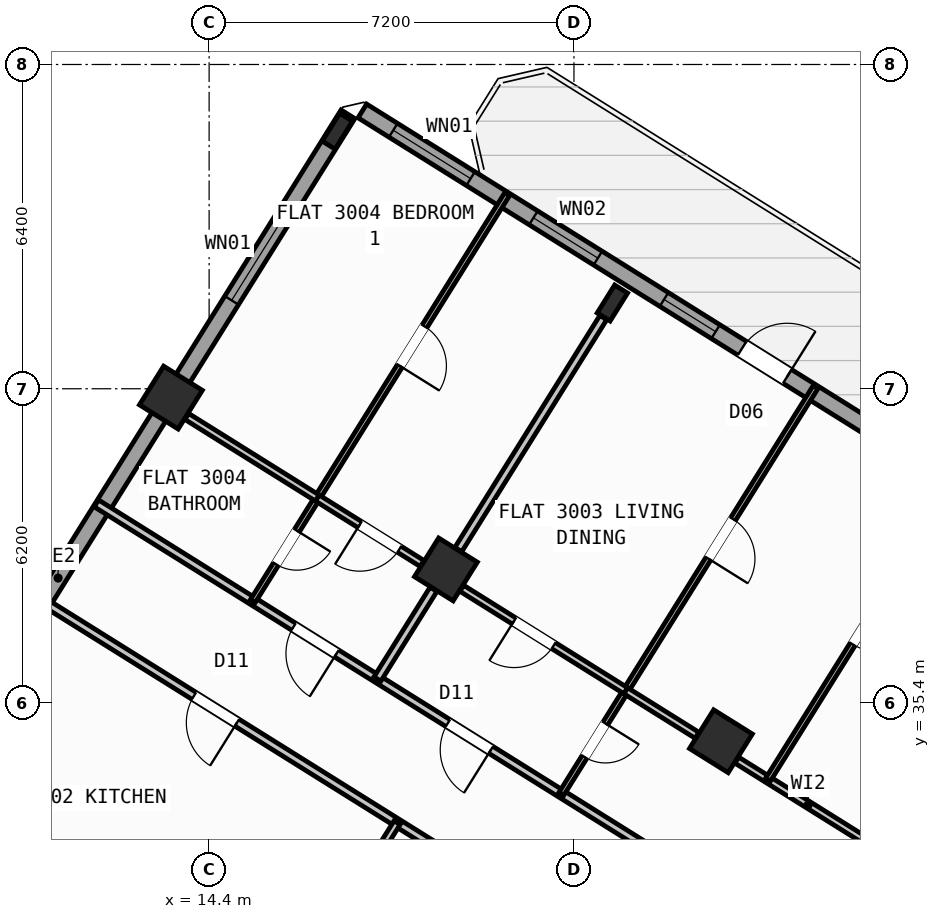
"""IFC4 building model, lengths in metres.
Left out: names, types, materials, properties, quantities, classifications, styles, units other than length and angle.
Written with IfcOpenShell. Run it as: python <this file> out.ifc"""

import sys

from ifc_helpers import new_model, si_unit, direction, frame, frame_2d, origin, origin_2d, place, context, subcontext, project, spatial, rectangle, hollow_rectangle, i_section, extrude, source, transform, mapped, element, fill, save


model = new_model("IFC4")
c1 = context("Model", 3, precision=1e-05, world=origin(), true_north=direction((0.0, 1.0)))
c2 = subcontext(c1, "Body", "Model", "MODEL_VIEW")
j1 = project(units=[si_unit("LENGTHUNIT", "METRE"), si_unit("PLANEANGLEUNIT", "RADIAN")], contexts=[c1])
p1 = place(None, origin())
s1 = spatial("IfcSite", under=j1, at=p1, CompositionType="ELEMENT")
p2 = place(p1, origin())
s2 = spatial("IfcBuilding", under=s1, at=p2, CompositionType="ELEMENT")
p3 = place(p2, frame((0.0, 0.0, 119.7)))
s3 = spatial("IfcBuildingStorey", under=s2, at=p3, CompositionType="ELEMENT", Elevation=119.7)
m1 = source(origin(), c2, "Body", "SweptSolid", [
    extrude(hollow_rectangle(XDim=0.9, YDim=0.9, WallThickness=0.036, at=origin_2d()), origin(), (0.0, 0.0, 1.0), 3.6),
])
p4 = place(p3, frame((24.5, 34.643, 0.0), z_axis=(0.0, 0.0, 1.0), x_axis=(-0.848048096156, 0.529919264233, 0.0)))
e1 = element("IfcColumn", 1, at=p4, inside=s3, PredefinedType="COLUMN", context=c2, shape_type="MappedRepresentation", body=[
    mapped(m1, transform((0.0, 0.0, 0.0), scale=1.0)),
])
m2 = source(origin(), c2, "Body", "SweptSolid", [
    extrude(i_section(OverallWidth=0.3, OverallDepth=0.65, WebThickness=0.016, FlangeThickness=0.031, at=origin_2d()), origin(), (0.0, 0.0, 1.0), 3.6),
])
p5 = place(p3, frame((22.358, 43.292, 0.0), z_axis=(0.0, 0.0, 1.0), x_axis=(-0.848048096156, 0.529919264233, 0.0)))
e2 = element("IfcColumn", 2, at=p5, inside=s3, PredefinedType="COLUMN", context=c2, shape_type="MappedRepresentation", body=[
    mapped(m2, transform((0.0, 0.0, 0.0), scale=1.0)),
])
p6 = place(p3, frame((19.073, 38.034, 0.0), z_axis=(0.0, 0.0, 1.0), x_axis=(-0.848048096156, 0.529919264233, 0.0)))
e3 = element("IfcColumn", 3, at=p6, inside=s3, PredefinedType="COLUMN", context=c2, shape_type="MappedRepresentation", body=[
    mapped(m1, transform((0.0, 0.0, 0.0), scale=1.0)),
])
p7 = place(p3, frame((16.931, 46.684, 0.0), z_axis=(0.0, 0.0, 1.0), x_axis=(-0.848048096156, 0.529919264233, 0.0)))
e4 = element("IfcColumn", 4, at=p7, inside=s3, PredefinedType="COLUMN", context=c2, shape_type="MappedRepresentation", body=[
    mapped(m2, transform((0.0, 0.0, 0.0), scale=1.0)),
])
p8 = place(p3, frame((13.646, 41.426, 0.0), z_axis=(0.0, 0.0, 1.0), x_axis=(-0.848048096156, 0.529919264233, 0.0)))
e5 = element("IfcColumn", 5, at=p8, inside=s3, PredefinedType="COLUMN", context=c2, shape_type="MappedRepresentation", body=[
    mapped(m1, transform((0.0, 0.0, 0.0), scale=1.0)),
])
p9 = place(p3, frame((5.7, 28.71, 0.0), z_axis=(0.0, 0.0, 1.0), x_axis=(0.529923711467, 0.8480453172, 0.0)))
e6 = element("IfcWall", 6, at=p9, inside=s3, PredefinedType="STANDARD", context=c2, shape_type="SweptSolid", body=[
    extrude(rectangle(XDim=21.587, YDim=0.32, at=frame_2d((10.794, 0.0))), origin(), (0.0, 0.0, 1.0), 2.775),
])
p10 = place(p9, frame((2.119, 0.0, 0.8)))
e7 = element("IfcOpeningElement", 7, at=p10, cuts=e6, PredefinedType="OPENING", context=c2, shape_type="SweptSolid", body=[
    extrude(rectangle(XDim=2.1, YDim=1.55, at=frame_2d((1.05, 0.775))), frame((0.0, 0.17, 0.0), z_axis=(0.0, -1.0, 0.0), x_axis=(1.0, 0.0, 0.0)), (0.0, 0.0, 1.0), 0.34),
])
p11 = place(p9, frame((17.256, 0.0, 0.85)))
e8 = element("IfcOpeningElement", 8, at=p11, cuts=e6, PredefinedType="OPENING", context=c2, shape_type="SweptSolid", body=[
    extrude(rectangle(XDim=1.8, YDim=1.5, at=frame_2d((0.9, 0.75))), frame((0.0, 0.17, 0.0), z_axis=(0.0, -1.0, 0.0), x_axis=(1.0, 0.0, 0.0)), (0.0, 0.0, 1.0), 0.34),
])
p12 = place(p3, frame((17.424, 47.083, 0.0), z_axis=(0.0, 0.0, 1.0), x_axis=(0.848049927979, -0.529916332693, 0.0)))
e9 = element("IfcWall", 9, at=p12, inside=s3, PredefinedType="STANDARD", context=c2, shape_type="SweptSolid", body=[
    extrude(rectangle(XDim=29.223, YDim=0.32, at=frame_2d((14.612, 0.0))), origin(), (0.0, 0.0, 1.0), 3.35),
])
p13 = place(p12, frame((8.839, 0.0, 0.0)))
e10 = element("IfcOpeningElement", 10, at=p13, cuts=e9, PredefinedType="OPENING", context=c2, shape_type="SweptSolid", body=[
    extrude(rectangle(XDim=1.05, YDim=2.15, at=frame_2d((0.525, 1.075))), frame((0.0, 0.17, 0.0), z_axis=(0.0, -1.0, 0.0), x_axis=(1.0, 0.0, 0.0)), (0.0, 0.0, 1.0), 0.34),
])
p14 = place(p12, frame((0.719, 0.0, 0.85)))
e11 = element("IfcOpeningElement", 11, at=p14, cuts=e9, PredefinedType="OPENING", context=c2, shape_type="SweptSolid", body=[
    extrude(rectangle(XDim=1.8, YDim=1.5, at=frame_2d((0.9, 0.75))), frame((0.0, 0.17, 0.0), z_axis=(0.0, -1.0, 0.0), x_axis=(1.0, 0.0, 0.0)), (0.0, 0.0, 1.0), 0.34),
])
p15 = place(p12, frame((3.981, 0.0, 0.85)))
e12 = element("IfcOpeningElement", 12, at=p15, cuts=e9, PredefinedType="OPENING", context=c2, shape_type="SweptSolid", body=[
    extrude(rectangle(XDim=1.5, YDim=1.5, at=frame_2d((0.75, 0.75))), frame((0.0, 0.17, 0.0), z_axis=(0.0, -1.0, 0.0), x_axis=(1.0, 0.0, 0.0)), (0.0, 0.0, 1.0), 0.34),
])
p16 = place(p12, frame((7.021, 0.0, 0.95)))
e13 = element("IfcOpeningElement", 13, at=p16, cuts=e9, PredefinedType="OPENING", context=c2, shape_type="SweptSolid", body=[
    extrude(rectangle(XDim=1.2, YDim=1.4, at=frame_2d((0.6, 0.7))), frame((0.0, 0.17, 0.0), z_axis=(0.0, -1.0, 0.0), x_axis=(1.0, 0.0, 0.0)), (0.0, 0.0, 1.0), 0.34),
])
p17 = place(p12, frame((14.471, 0.0, 0.95)))
e14 = element("IfcOpeningElement", 14, at=p17, cuts=e9, PredefinedType="OPENING", context=c2, shape_type="SweptSolid", body=[
    extrude(rectangle(XDim=1.2, YDim=1.4, at=frame_2d((0.6, 0.7))), frame((0.0, 0.17, 0.0), z_axis=(0.0, -1.0, 0.0), x_axis=(1.0, 0.0, 0.0)), (0.0, 0.0, 1.0), 0.34),
])
p18 = place(p12, frame((17.254, 0.0, 1.0)))
e15 = element("IfcOpeningElement", 15, at=p18, cuts=e9, PredefinedType="OPENING", context=c2, shape_type="SweptSolid", body=[
    extrude(rectangle(XDim=0.9, YDim=1.25, at=frame_2d((0.45, 0.625))), frame((0.0, 0.17, 0.0), z_axis=(0.0, -1.0, 0.0), x_axis=(1.0, 0.0, 0.0)), (0.0, 0.0, 1.0), 0.34),
])
p19 = place(p12, frame((20.764, 0.0, 0.8)))
e16 = element("IfcOpeningElement", 16, at=p19, cuts=e9, PredefinedType="OPENING", context=c2, shape_type="SweptSolid", body=[
    extrude(rectangle(XDim=2.1, YDim=1.55, at=frame_2d((1.05, 0.775))), frame((0.0, 0.17, 0.0), z_axis=(0.0, -1.0, 0.0), x_axis=(1.0, 0.0, 0.0)), (0.0, 0.0, 1.0), 0.34),
])
p20 = place(p12, frame((25.403, 0.0, 0.8)))
e17 = element("IfcOpeningElement", 17, at=p20, cuts=e9, PredefinedType="OPENING", context=c2, shape_type="SweptSolid", body=[
    extrude(rectangle(XDim=2.1, YDim=1.55, at=frame_2d((1.05, 0.775))), frame((0.0, 0.17, 0.0), z_axis=(0.0, -1.0, 0.0), x_axis=(1.0, 0.0, 0.0)), (0.0, 0.0, 1.0), 0.34),
])
p21 = place(p3, frame((31.239, 38.274, 0.0), z_axis=(0.0, 0.0, 1.0), x_axis=(-0.529920220799, -0.848047498427, 0.0)))
e18 = element("IfcWall", 18, at=p21, inside=s3, PredefinedType="PARTITIONING", context=c2, shape_type="SweptSolid", body=[
    extrude(rectangle(XDim=9.2, YDim=0.16, at=frame_2d((4.6, 0.0))), origin(), (0.0, 0.0, 1.0), 3.34),
])
p22 = place(p3, frame((26.363, 30.472, 0.0), z_axis=(0.0, 0.0, 1.0), x_axis=(-0.848052408131, 0.529912363569, 0.0)))
e19 = element("IfcWall", 19, at=p22, inside=s3, PredefinedType="PARTITIONING", context=c2, shape_type="SweptSolid", body=[
    extrude(rectangle(XDim=16.73, YDim=0.16, at=frame_2d((8.365, 0.0))), origin(), (0.0, 0.0, 1.0), 3.34),
])
p23 = place(p22, frame((7.55, 0.0, 0.0)))
e20 = element("IfcOpeningElement", 20, at=p23, cuts=e19, PredefinedType="OPENING", context=c2, shape_type="SweptSolid", body=[
    extrude(rectangle(XDim=1.0, YDim=2.1, at=frame_2d((0.5, 1.05))), frame((0.0, 0.09, 0.0), z_axis=(0.0, -1.0, 0.0), x_axis=(1.0, 0.0, 0.0)), (0.0, 0.0, 1.0), 0.18),
])
p24 = place(p22, frame((11.14, 0.0, 0.0)))
e21 = element("IfcOpeningElement", 21, at=p24, cuts=e19, PredefinedType="OPENING", context=c2, shape_type="SweptSolid", body=[
    extrude(rectangle(XDim=1.0, YDim=2.1, at=frame_2d((0.5, 1.05))), frame((0.0, 0.09, 0.0), z_axis=(0.0, -1.0, 0.0), x_axis=(1.0, 0.0, 0.0)), (0.0, 0.0, 1.0), 0.18),
])
p25 = place(p3, frame((25.198, 28.606, 0.0), z_axis=(0.0, 0.0, 1.0), x_axis=(-0.848052408131, 0.529912363569, 0.0)))
e22 = element("IfcWall", 22, at=p25, inside=s3, PredefinedType="PARTITIONING", context=c2, shape_type="SweptSolid", body=[
    extrude(rectangle(XDim=16.73, YDim=0.16, at=frame_2d((8.365, 0.0))), origin(), (0.0, 0.0, 1.0), 3.34),
])
p26 = place(p25, frame((2.22, 0.0, 0.0)))
e23 = element("IfcOpeningElement", 23, at=p26, cuts=e22, PredefinedType="OPENING", context=c2, shape_type="SweptSolid", body=[
    extrude(rectangle(XDim=0.86, YDim=2.05, at=frame_2d((0.43, 1.025))), frame((0.0, 0.09, 0.0), z_axis=(0.0, -1.0, 0.0), x_axis=(1.0, 0.0, 0.0)), (0.0, 0.0, 1.0), 0.18),
])
p27 = place(p25, frame((12.084, 0.0, 0.0)))
e24 = element("IfcOpeningElement", 24, at=p27, cuts=e22, PredefinedType="OPENING", context=c2, shape_type="SweptSolid", body=[
    extrude(rectangle(XDim=1.0, YDim=2.1, at=frame_2d((0.5, 1.05))), frame((0.0, 0.09, 0.0), z_axis=(0.0, -1.0, 0.0), x_axis=(1.0, 0.0, 0.0)), (0.0, 0.0, 1.0), 0.18),
])
p28 = place(p3, frame((19.556, 26.73, 0.0), z_axis=(0.0, 0.0, 1.0), x_axis=(-0.848043949058, 0.52992590092, 0.0)))
e25 = element("IfcWall", 25, at=p28, inside=s3, PredefinedType="PLUMBINGWALL", context=c2, shape_type="SweptSolid", body=[
    extrude(rectangle(XDim=12.92, YDim=0.14, at=frame_2d((6.46, 0.0))), origin(), (0.0, 0.0, 1.0), 3.34),
])
p29 = place(p28, frame((5.849, 0.0, 0.0)))
e26 = element("IfcOpeningElement", 26, at=p29, cuts=e25, PredefinedType="OPENING", context=c2, shape_type="SweptSolid", body=[
    extrude(rectangle(XDim=0.92, YDim=2.08, at=frame_2d((0.46, 1.04))), frame((0.0, 0.08, 0.0), z_axis=(0.0, -1.0, 0.0), x_axis=(1.0, 0.0, 0.0)), (0.0, 0.0, 1.0), 0.16),
])
p30 = place(p3, frame((18.109, 33.035, 0.0), z_axis=(0.0, 0.0, 1.0), x_axis=(-0.529893526057, -0.848064178611, 0.0)))
e27 = element("IfcWall", 27, at=p30, inside=s3, PredefinedType="PLUMBINGWALL", context=c2, shape_type="SweptSolid", body=[
    extrude(rectangle(XDim=4.58, YDim=0.14, at=frame_2d((2.29, 0.0))), origin(), (0.0, 0.0, 1.0), 3.34),
])
p31 = place(p30, frame((1.9, 0.0, 0.0)))
e28 = element("IfcOpeningElement", 28, at=p31, cuts=e27, PredefinedType="OPENING", context=c2, shape_type="SweptSolid", body=[
    extrude(rectangle(XDim=0.78, YDim=2.05, at=frame_2d((0.39, 1.025))), frame((0.0, 0.08, 0.0), z_axis=(0.0, -1.0, 0.0), x_axis=(1.0, 0.0, 0.0)), (0.0, 0.0, 1.0), 0.16),
])
p32 = place(p3, frame((22.18, 43.006, 0.0), z_axis=(0.0, 0.0, 1.0), x_axis=(-0.529913610495, -0.848051628978, 0.0)))
e29 = element("IfcWall", 29, at=p32, inside=s3, PredefinedType="PARTITIONING", context=c2, shape_type="SweptSolid", body=[
    extrude(rectangle(XDim=5.401, YDim=0.16, at=frame_2d((2.7, 0.0))), origin(), (0.0, 0.0, 1.0), 2.775),
])
p33 = place(p3, frame((18.828, 37.643, 0.0), z_axis=(0.0, 0.0, 1.0), x_axis=(-0.529904345651, -0.848057418139, 0.0)))
e30 = element("IfcWall", 30, at=p33, inside=s3, PredefinedType="PARTITIONING", context=c2, shape_type="SweptSolid", body=[
    extrude(rectangle(XDim=2.088, YDim=0.16, at=frame_2d((1.044, 0.0))), origin(), (0.0, 0.0, 1.0), 2.775),
])
p34 = place(p3, frame((26.37, 41.635, 0.0), z_axis=(0.0, 0.0, 1.0), x_axis=(-0.529917830441, -0.848048992088, 0.0)))
e31 = element("IfcWall", 31, at=p34, inside=s3, PredefinedType="PARTITIONING", context=c2, shape_type="SweptSolid", body=[
    extrude(rectangle(XDim=9.47, YDim=0.11, at=frame_2d((4.735, 0.0))), origin(), (0.0, 0.0, 1.0), 2.995),
])
p35 = place(p34, frame((7.83, 0.0, 0.0)))
e32 = element("IfcOpeningElement", 32, at=p35, cuts=e31, PredefinedType="OPENING", context=c2, shape_type="SweptSolid", body=[
    extrude(rectangle(XDim=0.78, YDim=2.05, at=frame_2d((0.39, 1.025))), frame((0.0, 0.065, 0.0), z_axis=(0.0, -1.0, 0.0), x_axis=(1.0, 0.0, 0.0)), (0.0, 0.0, 1.0), 0.13),
])
p36 = place(p34, frame((3.075, 0.0, 0.0)))
e33 = element("IfcOpeningElement", 33, at=p36, cuts=e31, PredefinedType="OPENING", context=c2, shape_type="SweptSolid", body=[
    extrude(rectangle(XDim=0.92, YDim=2.08, at=frame_2d((0.46, 1.04))), frame((0.0, 0.065, 0.0), z_axis=(0.0, -1.0, 0.0), x_axis=(1.0, 0.0, 0.0)), (0.0, 0.0, 1.0), 0.13),
])
p37 = place(p3, frame((22.623, 35.639, 0.0), z_axis=(0.0, 0.0, 1.0), x_axis=(-0.8480485946, 0.529918466555, 0.0)))
e34 = element("IfcWall", 34, at=p37, inside=s3, PredefinedType="PLUMBINGWALL", context=c2, shape_type="SweptSolid", body=[
    extrude(rectangle(XDim=3.818, YDim=0.14, at=frame_2d((1.909, 0.0))), origin(), (0.0, 0.0, 1.0), 2.775),
])
p38 = place(p37, frame((1.68, 0.0, 0.0)))
e35 = element("IfcOpeningElement", 35, at=p38, cuts=e34, PredefinedType="OPENING", context=c2, shape_type="SweptSolid", body=[
    extrude(rectangle(XDim=0.92, YDim=2.08, at=frame_2d((0.46, 1.04))), frame((0.0, 0.08, 0.0), z_axis=(0.0, -1.0, 0.0), x_axis=(1.0, 0.0, 0.0)), (0.0, 0.0, 1.0), 0.16),
])
p39 = place(p3, frame((27.635, 32.507, 0.0), z_axis=(0.0, 0.0, 1.0), x_axis=(-0.848064240775, 0.529893426567, 0.0)))
e36 = element("IfcWall", 36, at=p39, inside=s3, PredefinedType="PLUMBINGWALL", context=c2, shape_type="SweptSolid", body=[
    extrude(rectangle(XDim=3.328, YDim=0.14, at=frame_2d((1.664, 0.0))), origin(), (0.0, 0.0, 1.0), 2.775),
])
p40 = place(p3, frame((24.029, 34.76, 0.0), z_axis=(0.0, 0.0, 1.0), x_axis=(-0.848023120795, 0.529959231071, 0.0)))
e37 = element("IfcWall", 37, at=p40, inside=s3, PredefinedType="PLUMBINGWALL", context=c2, shape_type="SweptSolid", body=[
    extrude(rectangle(XDim=1.658, YDim=0.14, at=frame_2d((0.829, 0.0))), origin(), (0.0, 0.0, 1.0), 2.775),
])
p41 = place(p3, frame((29.177, 39.881, 0.0), z_axis=(0.0, 0.0, 1.0), x_axis=(-0.529930649952, -0.848040981463, 0.0)))
e38 = element("IfcWall", 38, at=p41, inside=s3, PredefinedType="PARTITIONING", context=c2, shape_type="SweptSolid", body=[
    extrude(rectangle(XDim=7.07, YDim=0.11, at=frame_2d((3.535, 0.0))), origin(), (0.0, 0.0, 1.0), 3.34),
])
p42 = place(p41, frame((3.0, 0.0, 0.0)))
e39 = element("IfcOpeningElement", 39, at=p42, cuts=e38, PredefinedType="OPENING", context=c2, shape_type="SweptSolid", body=[
    extrude(rectangle(XDim=0.92, YDim=2.08, at=frame_2d((0.46, 1.04))), frame((0.0, 0.065, 0.0), z_axis=(0.0, -1.0, 0.0), x_axis=(1.0, 0.0, 0.0)), (0.0, 0.0, 1.0), 0.13),
])
p43 = place(p3, frame((20.281, 45.44, 0.0), z_axis=(0.0, 0.0, 1.0), x_axis=(-0.529917830441, -0.848048992088, 0.0)))
e40 = element("IfcWall", 40, at=p43, inside=s3, PredefinedType="PARTITIONING", context=c2, shape_type="SweptSolid", body=[
    extrude(rectangle(XDim=9.47, YDim=0.11, at=frame_2d((4.735, 0.0))), origin(), (0.0, 0.0, 1.0), 3.34),
])
p44 = place(p43, frame((7.83, 0.0, 0.0)))
e41 = element("IfcOpeningElement", 41, at=p44, cuts=e40, PredefinedType="OPENING", context=c2, shape_type="SweptSolid", body=[
    extrude(rectangle(XDim=0.78, YDim=2.05, at=frame_2d((0.39, 1.025))), frame((0.0, 0.065, 0.0), z_axis=(0.0, -1.0, 0.0), x_axis=(1.0, 0.0, 0.0)), (0.0, 0.0, 1.0), 0.13),
])
p45 = place(p43, frame((3.075, 0.0, 0.0)))
e42 = element("IfcOpeningElement", 42, at=p45, cuts=e40, PredefinedType="OPENING", context=c2, shape_type="SweptSolid", body=[
    extrude(rectangle(XDim=0.92, YDim=2.08, at=frame_2d((0.46, 1.04))), frame((0.0, 0.065, 0.0), z_axis=(0.0, -1.0, 0.0), x_axis=(1.0, 0.0, 0.0)), (0.0, 0.0, 1.0), 0.13),
])
p46 = place(p3, frame((18.602, 38.152, 0.0), z_axis=(0.0, 0.0, 1.0), x_axis=(-0.848020807548, 0.529962932634, 0.0)))
e43 = element("IfcWall", 43, at=p46, inside=s3, PredefinedType="PLUMBINGWALL", context=c2, shape_type="SweptSolid", body=[
    extrude(rectangle(XDim=2.438, YDim=0.14, at=frame_2d((1.219, 0.0))), origin(), (0.0, 0.0, 1.0), 2.775),
])
p47 = place(p46, frame((0.528, 0.0, 0.0)))
e44 = element("IfcOpeningElement", 44, at=p47, cuts=e43, PredefinedType="OPENING", context=c2, shape_type="SweptSolid", body=[
    extrude(rectangle(XDim=0.92, YDim=2.08, at=frame_2d((0.46, 1.04))), frame((0.0, 0.08, 0.0), z_axis=(0.0, -1.0, 0.0), x_axis=(1.0, 0.0, 0.0)), (0.0, 0.0, 1.0), 0.16),
])
p48 = place(p3, frame((16.534, 39.444, 0.0), z_axis=(0.0, 0.0, 1.0), x_axis=(-0.848056989933, 0.52990503095, 0.0)))
e45 = element("IfcWall", 45, at=p48, inside=s3, PredefinedType="PLUMBINGWALL", context=c2, shape_type="SweptSolid", body=[
    extrude(rectangle(XDim=3.038, YDim=0.14, at=frame_2d((1.519, 0.0))), origin(), (0.0, 0.0, 1.0), 2.775),
])
m3 = source(origin(), c2, "Body", "SweptSolid", [
    extrude(rectangle(XDim=1.05, YDim=2.15, at=frame_2d((0.525, 1.075))), frame((0.0, 0.025, 0.0), z_axis=(0.0, -1.0, 0.0), x_axis=(1.0, 0.0, 0.0)), (0.0, 0.0, 1.0), 0.05),
])
p49 = place(p13, origin())
e46 = element("IfcDoor", 46, at=p49, inside=s3, OperationType="SINGLE_SWING_RIGHT", PredefinedType="DOOR", context=c2, shape_type="MappedRepresentation", body=[
    mapped(m3, transform((0.0, 0.0, 0.0), scale=1.0)),
])
fill(e10, e46)
m4 = source(origin(), c2, "Body", "SweptSolid", [
    extrude(rectangle(XDim=1.8, YDim=1.5, at=frame_2d((0.9, 0.75))), frame((0.0, 0.03, 0.0), z_axis=(0.0, -1.0, 0.0), x_axis=(1.0, 0.0, 0.0)), (0.0, 0.0, 1.0), 0.06),
])
p50 = place(p11, origin())
e47 = element("IfcWindow", 47, at=p50, inside=s3, PartitioningType="SINGLE_PANEL", PredefinedType="WINDOW", context=c2, shape_type="MappedRepresentation", body=[
    mapped(m4, transform((0.0, 0.0, 0.0), scale=1.0)),
])
fill(e8, e47)
p51 = place(p14, origin())
e48 = element("IfcWindow", 48, at=p51, inside=s3, PartitioningType="SINGLE_PANEL", PredefinedType="WINDOW", context=c2, shape_type="MappedRepresentation", body=[
    mapped(m4, transform((0.0, 0.0, 0.0), scale=1.0)),
])
fill(e11, e48)
m5 = source(origin(), c2, "Body", "SweptSolid", [
    extrude(rectangle(XDim=1.5, YDim=1.5, at=frame_2d((0.75, 0.75))), frame((0.0, 0.03, 0.0), z_axis=(0.0, -1.0, 0.0), x_axis=(1.0, 0.0, 0.0)), (0.0, 0.0, 1.0), 0.06),
])
p52 = place(p15, origin())
e49 = element("IfcWindow", 49, at=p52, inside=s3, PartitioningType="SINGLE_PANEL", PredefinedType="WINDOW", context=c2, shape_type="MappedRepresentation", body=[
    mapped(m5, transform((0.0, 0.0, 0.0), scale=1.0)),
])
fill(e12, e49)
m6 = source(origin(), c2, "Body", "SweptSolid", [
    extrude(rectangle(XDim=1.2, YDim=1.4, at=frame_2d((0.6, 0.7))), frame((0.0, 0.03, 0.0), z_axis=(0.0, -1.0, 0.0), x_axis=(1.0, 0.0, 0.0)), (0.0, 0.0, 1.0), 0.06),
])
p53 = place(p16, origin())
e50 = element("IfcWindow", 50, at=p53, inside=s3, PartitioningType="SINGLE_PANEL", PredefinedType="WINDOW", context=c2, shape_type="MappedRepresentation", body=[
    mapped(m6, transform((0.0, 0.0, 0.0), scale=1.0)),
])
fill(e13, e50)
m7 = source(origin(), c2, "Body", "SweptSolid", [
    extrude(rectangle(XDim=1.0, YDim=2.1, at=frame_2d((0.5, 1.05))), frame((0.0, 0.025, 0.0), z_axis=(0.0, -1.0, 0.0), x_axis=(1.0, 0.0, 0.0)), (0.0, 0.0, 1.0), 0.05),
])
p54 = place(p27, origin())
e51 = element("IfcDoor", 51, at=p54, inside=s3, OperationType="SINGLE_SWING_LEFT", PredefinedType="DOOR", context=c2, shape_type="MappedRepresentation", body=[
    mapped(m7, transform((0.0, 0.0, 0.0), scale=1.0)),
])
fill(e24, e51)
p55 = place(p23, origin())
e52 = element("IfcDoor", 52, at=p55, inside=s3, OperationType="SINGLE_SWING_LEFT", PredefinedType="DOOR", context=c2, shape_type="MappedRepresentation", body=[
    mapped(m7, transform((0.0, 0.0, 0.0), scale=1.0)),
])
fill(e20, e52)
m8 = source(origin(), c2, "Body", "SweptSolid", [
    extrude(rectangle(XDim=0.92, YDim=2.08, at=frame_2d((0.46, 1.04))), frame((0.0, 0.025, 0.0), z_axis=(0.0, -1.0, 0.0), x_axis=(1.0, 0.0, 0.0)), (0.0, 0.0, 1.0), 0.05),
])
p56 = place(p38, origin())
e53 = element("IfcDoor", 53, at=p56, inside=s3, OperationType="SINGLE_SWING_RIGHT", PredefinedType="DOOR", context=c2, shape_type="MappedRepresentation", body=[
    mapped(m8, transform((0.0, 0.0, 0.0), scale=1.0)),
])
fill(e35, e53)
m9 = source(origin(), c2, "Body", "SweptSolid", [
    extrude(rectangle(XDim=0.78, YDim=2.05, at=frame_2d((0.39, 1.025))), frame((0.0, 0.025, 0.0), z_axis=(0.0, -1.0, 0.0), x_axis=(1.0, 0.0, 0.0)), (0.0, 0.0, 1.0), 0.05),
])
p57 = place(p35, origin())
e54 = element("IfcDoor", 54, at=p57, inside=s3, OperationType="SINGLE_SWING_LEFT", PredefinedType="DOOR", context=c2, shape_type="MappedRepresentation", body=[
    mapped(m9, transform((0.0, 0.0, 0.0), scale=1.0)),
])
fill(e32, e54)
p58 = place(p36, origin())
e55 = element("IfcDoor", 55, at=p58, inside=s3, OperationType="SINGLE_SWING_RIGHT", PredefinedType="DOOR", context=c2, shape_type="MappedRepresentation", body=[
    mapped(m8, transform((0.0, 0.0, 0.0), scale=1.0)),
])
fill(e33, e55)
p59 = place(p42, origin())
e56 = element("IfcDoor", 56, at=p59, inside=s3, OperationType="SINGLE_SWING_LEFT", PredefinedType="DOOR", context=c2, shape_type="MappedRepresentation", body=[
    mapped(m8, transform((0.0, 0.0, 0.0), scale=1.0)),
])
fill(e39, e56)
p60 = place(p24, origin())
e57 = element("IfcDoor", 57, at=p60, inside=s3, OperationType="SINGLE_SWING_LEFT", PredefinedType="DOOR", context=c2, shape_type="MappedRepresentation", body=[
    mapped(m7, transform((0.0, 0.0, 0.0), scale=1.0)),
])
fill(e21, e57)
p61 = place(p47, origin())
e58 = element("IfcDoor", 58, at=p61, inside=s3, OperationType="SINGLE_SWING_RIGHT", PredefinedType="DOOR", context=c2, shape_type="MappedRepresentation", body=[
    mapped(m8, transform((0.0, 0.0, 0.0), scale=1.0)),
])
fill(e44, e58)
p62 = place(p44, origin())
e59 = element("IfcDoor", 59, at=p62, inside=s3, OperationType="SINGLE_SWING_LEFT", PredefinedType="DOOR", context=c2, shape_type="MappedRepresentation", body=[
    mapped(m9, transform((0.0, 0.0, 0.0), scale=1.0)),
])
fill(e41, e59)
p63 = place(p45, origin())
e60 = element("IfcDoor", 60, at=p63, inside=s3, OperationType="SINGLE_SWING_RIGHT", PredefinedType="DOOR", context=c2, shape_type="MappedRepresentation", body=[
    mapped(m8, transform((0.0, 0.0, 0.0), scale=1.0)),
])
fill(e42, e60)
save(model, sys.argv[1])
